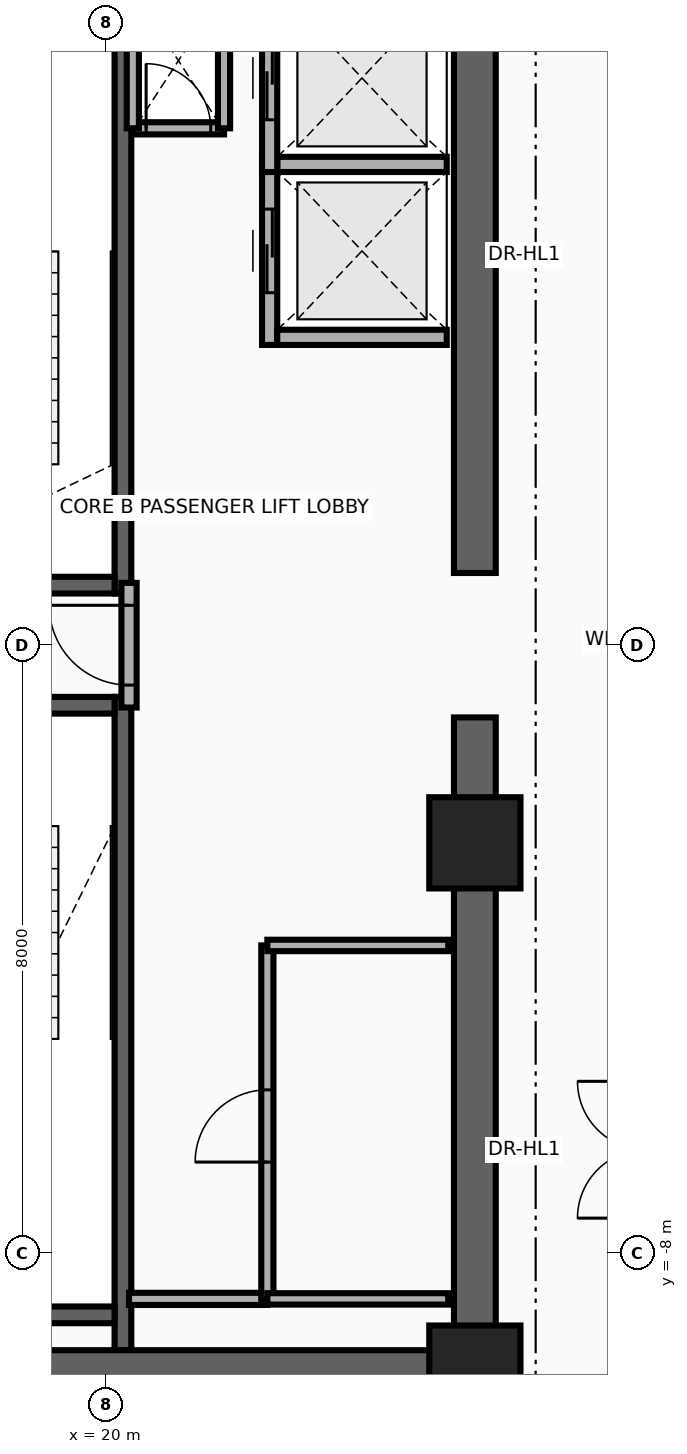
"""IFC4 building model, lengths in metres.
Left out: names, types, materials, properties, quantities, classifications, styles, units other than length and angle.
Written with IfcOpenShell. Run it as: python <this file> out.ifc"""

import sys

from ifc_helpers import new_model, si_unit, direction, frame, frame_2d, origin, origin_2d, place, context, subcontext, project, spatial, rectangle, extrude, source, transform, mapped, element, fill, save


model = new_model("IFC4")
c1 = context("Model", 3, precision=1e-05, world=origin(), true_north=direction((0.0, 1.0)))
c2 = subcontext(c1, "Body", "Model", "MODEL_VIEW")
j1 = project(units=[si_unit("LENGTHUNIT", "METRE"), si_unit("PLANEANGLEUNIT", "RADIAN")], contexts=[c1])
p1 = place(None, origin())
s1 = spatial("IfcSite", under=j1, at=p1, CompositionType="ELEMENT")
p2 = place(p1, origin())
s2 = spatial("IfcBuilding", under=s1, at=p2, CompositionType="ELEMENT")
p3 = place(p2, frame((0.0, 0.0, 164.9)))
s3 = spatial("IfcBuildingStorey", under=s2, at=p3, CompositionType="ELEMENT", Elevation=164.9)
p4 = place(p3, frame((20.22, 0.68, 0.0), z_axis=(0.0, 0.0, 1.0), x_axis=(0.0, 1.0, 0.0)))
e1 = element("IfcWall", 1, at=p4, inside=s3, PredefinedType="SHEAR", context=c2, shape_type="SweptSolid", body=[
    extrude(rectangle(XDim=8.595, YDim=0.22, at=frame_2d((4.297, 0.0))), origin(), (0.0, 0.0, 1.0), 3.46),
])
p5 = place(p3, frame((17.0, 0.79, 0.0), z_axis=(0.0, 0.0, 1.0), x_axis=(1.0, 0.0, 0.0)))
e2 = element("IfcWall", 2, at=p5, inside=s3, PredefinedType="SHEAR", context=c2, shape_type="SweptSolid", body=[
    extrude(rectangle(XDim=3.11, YDim=0.22, at=frame_2d((1.555, 0.0))), origin(), (0.0, 0.0, 1.0), 3.46),
])
p6 = place(p5, frame((0.95, 0.0, 0.0)))
e3 = element("IfcOpeningElement", 3, at=p6, cuts=e2, PredefinedType="OPENING", context=c2, shape_type="SweptSolid", body=[
    extrude(rectangle(XDim=1.1, YDim=2.15, at=frame_2d((0.55, 1.075))), frame((0.0, 0.125, 0.0), z_axis=(0.0, -1.0, 0.0), x_axis=(1.0, 0.0, 0.0)), (0.0, 0.0, 1.0), 0.25),
])
p7 = place(p3, frame((20.22, -9.275, 0.0), z_axis=(0.0, 0.0, 1.0), x_axis=(0.0, 1.0, 0.0)))
e4 = element("IfcWall", 4, at=p7, inside=s3, PredefinedType="SHEAR", context=c2, shape_type="SweptSolid", body=[
    extrude(rectangle(XDim=8.595, YDim=0.22, at=frame_2d((4.297, 0.0))), origin(), (0.0, 0.0, 1.0), 3.46),
])
p8 = place(p3, frame((17.0, -8.81, 0.0), z_axis=(0.0, 0.0, 1.0), x_axis=(1.0, 0.0, 0.0)))
e5 = element("IfcWall", 5, at=p8, inside=s3, PredefinedType="SHEAR", context=c2, shape_type="SweptSolid", body=[
    extrude(rectangle(XDim=3.11, YDim=0.22, at=frame_2d((1.555, 0.0))), origin(), (0.0, 0.0, 1.0), 3.46),
])
p9 = place(p3, frame((17.0, -0.79, 0.0), z_axis=(0.0, 0.0, 1.0), x_axis=(1.0, 0.0, 0.0)))
e6 = element("IfcWall", 6, at=p9, inside=s3, PredefinedType="SHEAR", context=c2, shape_type="SweptSolid", body=[
    extrude(rectangle(XDim=3.11, YDim=0.22, at=frame_2d((1.555, 0.0))), origin(), (0.0, 0.0, 1.0), 3.46),
])
p10 = place(p9, frame((0.95, 0.0, 0.0)))
e7 = element("IfcOpeningElement", 7, at=p10, cuts=e6, PredefinedType="OPENING", context=c2, shape_type="SweptSolid", body=[
    extrude(rectangle(XDim=1.1, YDim=2.15, at=frame_2d((0.55, 1.075))), frame((0.0, 0.125, 0.0), z_axis=(0.0, -1.0, 0.0), x_axis=(1.0, 0.0, 0.0)), (0.0, 0.0, 1.0), 0.25),
])
for number, where, z_axis, x_axis in (
    (8, (24.85, -9.825, 0.0), (0.0, 0.0, 1.0), (0.0, 1.0, 0.0)),
    (9, (24.85, 0.95, 0.0), (0.0, 0.0, 1.0), (0.0, 1.0, 0.0)),
):
    element("IfcWall", number, at=place(p3, frame(where, z_axis=z_axis, x_axis=x_axis)), inside=s3, PredefinedType="SHEAR", context=c2, shape_type="SweptSolid", body=[
        extrude(rectangle(XDim=8.875, YDim=0.55, at=frame_2d((4.438, 0.0))), origin(), (0.0, 0.0, 1.0), 3.46),
    ])
p11 = place(p3, frame((15.85, -9.55, 0.0), z_axis=(0.0, 0.0, 1.0), x_axis=(1.0, 0.0, 0.0)))
e10 = element("IfcWall", 10, at=p11, inside=s3, PredefinedType="SHEAR", context=c2, shape_type="SweptSolid", body=[
    extrude(rectangle(XDim=9.0, YDim=0.55, at=frame_2d((4.5, 0.0))), origin(), (0.0, 0.0, 1.0), 3.46),
])
m1 = source(origin(), c2, "Body", "SweptSolid", [
    extrude(rectangle(XDim=1.2, YDim=1.2, at=origin_2d()), origin(), (0.0, 0.0, 1.0), 3.7),
])
for number, where, z_axis, x_axis in (
    (11, (24.85, -9.55, 0.0), (0.0, 0.0, 1.0), (1.0, 0.0, 0.0)),
    (12, (24.85, -2.6, 0.0), (0.0, 0.0, 1.0), (1.0, 0.0, 0.0)),
):
    element("IfcColumn", number, at=place(p3, frame(where, z_axis=z_axis, x_axis=x_axis)), inside=s3, PredefinedType="COLUMN", context=c2, shape_type="MappedRepresentation", body=[
        mapped(m1, transform((0.0, 0.0, 0.0), x_axis=(1.0, 0.0, 0.0), y_axis=(0.0, 1.0, 0.0), z_axis=(0.0, 0.0, 1.0), scale=1.0)),
    ])
p12 = place(p3, frame((22.15, 3.95, 0.0), z_axis=(0.0, 0.0, 1.0), x_axis=(0.0, 1.0, 0.0)))
e13 = element("IfcWall", 13, at=p12, inside=s3, PredefinedType="MOVABLE", context=c2, shape_type="SweptSolid", body=[
    extrude(rectangle(XDim=2.475, YDim=0.2, at=frame_2d((1.238, 0.0))), origin(), (0.0, 0.0, 1.0), 3.46),
])
p13 = place(p12, frame((0.688, 0.0, 0.0)))
e14 = element("IfcOpeningElement", 14, at=p13, cuts=e13, PredefinedType="OPENING", context=c2, shape_type="SweptSolid", body=[
    extrude(rectangle(XDim=1.1, YDim=2.1, at=frame_2d((0.55, 1.05))), frame((0.0, 0.115, 0.0), z_axis=(0.0, -1.0, 0.0), x_axis=(1.0, 0.0, 0.0)), (0.0, 0.0, 1.0), 0.23),
])
for number, where, z_axis, x_axis in (
    (15, (22.25, 4.05, 0.0), (0.0, 0.0, 1.0), (1.0, 0.0, 0.0)),
    (16, (22.25, 6.325, 0.0), (0.0, 0.0, 1.0), (1.0, 0.0, 0.0)),
):
    element("IfcWall", number, at=place(p3, frame(where, z_axis=z_axis, x_axis=x_axis)), inside=s3, PredefinedType="MOVABLE", context=c2, shape_type="SweptSolid", body=[
        extrude(rectangle(XDim=2.23, YDim=0.2, at=frame_2d((1.115, 0.0))), origin(), (0.0, 0.0, 1.0), 3.46),
    ])
p14 = place(p3, frame((22.15, 6.225, 0.0), z_axis=(0.0, 0.0, 1.0), x_axis=(0.0, 1.0, 0.0)))
e17 = element("IfcWall", 17, at=p14, inside=s3, PredefinedType="MOVABLE", context=c2, shape_type="SweptSolid", body=[
    extrude(rectangle(XDim=2.475, YDim=0.2, at=frame_2d((1.237, 0.0))), origin(), (0.0, 0.0, 1.0), 3.46),
])
p15 = place(p14, frame((0.688, 0.0, 0.0)))
e18 = element("IfcOpeningElement", 18, at=p15, cuts=e17, PredefinedType="OPENING", context=c2, shape_type="SweptSolid", body=[
    extrude(rectangle(XDim=1.1, YDim=2.1, at=frame_2d((0.55, 1.05))), frame((0.0, 0.115, 0.0), z_axis=(0.0, -1.0, 0.0), x_axis=(1.0, 0.0, 0.0)), (0.0, 0.0, 1.0), 0.23),
])
p16 = place(p3, frame((20.3, -0.82, 0.0), z_axis=(0.0, 0.0, 1.0), x_axis=(0.0, 1.0, 0.0)))
e19 = element("IfcWall", 19, at=p16, inside=s3, PredefinedType="PARTITIONING", context=c2, shape_type="SweptSolid", body=[
    extrude(rectangle(XDim=1.64, YDim=0.2, at=frame_2d((0.82, 0.0))), origin(), (0.0, 0.0, 1.0), 3.46),
])
p17 = place(p16, frame((0.295, 0.0, 0.0)))
e20 = element("IfcOpeningElement", 20, at=p17, cuts=e19, PredefinedType="OPENING", context=c2, shape_type="SweptSolid", body=[
    extrude(rectangle(XDim=1.05, YDim=2.15, at=frame_2d((0.525, 1.075))), frame((0.0, 0.115, 0.0), z_axis=(0.0, -1.0, 0.0), x_axis=(1.0, 0.0, 0.0)), (0.0, 0.0, 1.0), 0.23),
])
p18 = place(p3, frame((20.35, 6.8, 0.0), z_axis=(0.0, 0.0, 1.0), x_axis=(1.0, 0.0, 0.0)))
e21 = element("IfcWall", 21, at=p18, inside=s3, PredefinedType="PARTITIONING", context=c2, shape_type="SweptSolid", body=[
    extrude(rectangle(XDim=1.2, YDim=0.16, at=frame_2d((0.6, 0.0))), origin(), (0.0, 0.0, 1.0), 3.46),
])
p19 = place(p18, frame((0.175, 0.0, 0.0)))
e22 = element("IfcOpeningElement", 22, at=p19, cuts=e21, PredefinedType="OPENING", context=c2, shape_type="SweptSolid", body=[
    extrude(rectangle(XDim=0.85, YDim=2.05, at=frame_2d((0.425, 1.025))), frame((0.0, 0.095, 0.0), z_axis=(0.0, -1.0, 0.0), x_axis=(1.0, 0.0, 0.0)), (0.0, 0.0, 1.0), 0.19),
])
for number, where, z_axis, x_axis in (
    (23, (21.55, 6.8, 0.0), (0.0, 0.0, 1.0), (0.0, 1.0, 0.0)),
    (24, (20.35, 6.8, 0.0), (0.0, 0.0, 1.0), (0.0, 1.0, 0.0)),
):
    element("IfcWall", number, at=place(p3, frame(where, z_axis=z_axis, x_axis=x_axis)), inside=s3, PredefinedType="PARTITIONING", context=c2, shape_type="SweptSolid", body=[
        extrude(rectangle(XDim=1.8, YDim=0.16, at=frame_2d((0.9, 0.0))), origin(), (0.0, 0.0, 1.0), 3.46),
    ])
p20 = place(p3, frame((20.3, -8.6, 0.0), z_axis=(0.0, 0.0, 1.0), x_axis=(1.0, 0.0, 0.0)))
e25 = element("IfcWall", 25, at=p20, inside=s3, PredefinedType="PARTITIONING", context=c2, shape_type="SweptSolid", body=[
    extrude(rectangle(XDim=1.82, YDim=0.16, at=frame_2d((0.91, 0.0))), origin(), (0.0, 0.0, 1.0), 3.46),
])
p21 = place(p3, frame((22.12, -8.6, 0.0), z_axis=(0.0, 0.0, 1.0), x_axis=(0.0, 1.0, 0.0)))
e26 = element("IfcWall", 26, at=p21, inside=s3, PredefinedType="PARTITIONING", context=c2, shape_type="SweptSolid", body=[
    extrude(rectangle(XDim=4.65, YDim=0.16, at=frame_2d((2.325, 0.0))), origin(), (0.0, 0.0, 1.0), 3.46),
])
p22 = place(p21, frame((1.8, 0.0, 0.0)))
e27 = element("IfcOpeningElement", 27, at=p22, cuts=e26, PredefinedType="OPENING", context=c2, shape_type="SweptSolid", body=[
    extrude(rectangle(XDim=0.95, YDim=2.15, at=frame_2d((0.475, 1.075))), frame((0.0, 0.095, 0.0), z_axis=(0.0, -1.0, 0.0), x_axis=(1.0, 0.0, 0.0)), (0.0, 0.0, 1.0), 0.19),
])
for number, where, z_axis, x_axis in (
    (28, (22.12, -3.95, 0.0), (0.0, 0.0, 1.0), (1.0, 0.0, 0.0)),
    (29, (22.12, -8.6, 0.0), (0.0, 0.0, 1.0), (1.0, 0.0, 0.0)),
):
    element("IfcWall", number, at=place(p3, frame(where, z_axis=z_axis, x_axis=x_axis)), inside=s3, PredefinedType="PARTITIONING", context=c2, shape_type="SweptSolid", body=[
        extrude(rectangle(XDim=2.38, YDim=0.15, at=frame_2d((1.19, 0.0))), origin(), (0.0, 0.0, 1.0), 3.46),
    ])
p23 = place(p13, origin())
e30 = element("IfcDoor", 30, at=p23, inside=s3, OperationType="DOUBLE_DOOR_SLIDING", PredefinedType="DOOR", context=c2, shape_type="SweptSolid", body=[
    extrude(rectangle(XDim=1.1, YDim=2.1, at=frame_2d((0.55, 1.05))), frame((0.0, 0.025, 0.0), z_axis=(0.0, -1.0, 0.0), x_axis=(1.0, 0.0, 0.0)), (0.0, 0.0, 1.0), 0.05),
])
fill(e14, e30)
p24 = place(p15, origin())
e31 = element("IfcDoor", 31, at=p24, inside=s3, OperationType="DOUBLE_DOOR_SLIDING", PredefinedType="DOOR", context=c2, shape_type="SweptSolid", body=[
    extrude(rectangle(XDim=1.1, YDim=2.1, at=frame_2d((0.55, 1.05))), frame((0.0, 0.025, 0.0), z_axis=(0.0, -1.0, 0.0), x_axis=(1.0, 0.0, 0.0)), (0.0, 0.0, 1.0), 0.05),
])
fill(e18, e31)
p25 = place(p17, origin())
e32 = element("IfcDoor", 32, at=p25, inside=s3, OperationType="SINGLE_SWING_RIGHT", PredefinedType="DOOR", context=c2, shape_type="SweptSolid", body=[
    extrude(rectangle(XDim=1.05, YDim=2.15, at=frame_2d((0.525, 1.075))), frame((0.0, 0.025, 0.0), z_axis=(0.0, -1.0, 0.0), x_axis=(1.0, 0.0, 0.0)), (0.0, 0.0, 1.0), 0.05),
])
fill(e20, e32)
p26 = place(p19, origin())
e33 = element("IfcDoor", 33, at=p26, inside=s3, OperationType="SINGLE_SWING_LEFT", PredefinedType="DOOR", context=c2, shape_type="SweptSolid", body=[
    extrude(rectangle(XDim=0.85, YDim=2.05, at=frame_2d((0.425, 1.025))), frame((0.0, 0.025, 0.0), z_axis=(0.0, -1.0, 0.0), x_axis=(1.0, 0.0, 0.0)), (0.0, 0.0, 1.0), 0.05),
])
fill(e22, e33)
p27 = place(p22, origin())
e34 = element("IfcDoor", 34, at=p27, inside=s3, OperationType="SINGLE_SWING_RIGHT", PredefinedType="DOOR", context=c2, shape_type="SweptSolid", body=[
    extrude(rectangle(XDim=0.95, YDim=2.15, at=frame_2d((0.475, 1.075))), frame((0.0, 0.025, 0.0), z_axis=(0.0, -1.0, 0.0), x_axis=(1.0, 0.0, 0.0)), (0.0, 0.0, 1.0), 0.05),
])
fill(e27, e34)
save(model, sys.argv[1])
